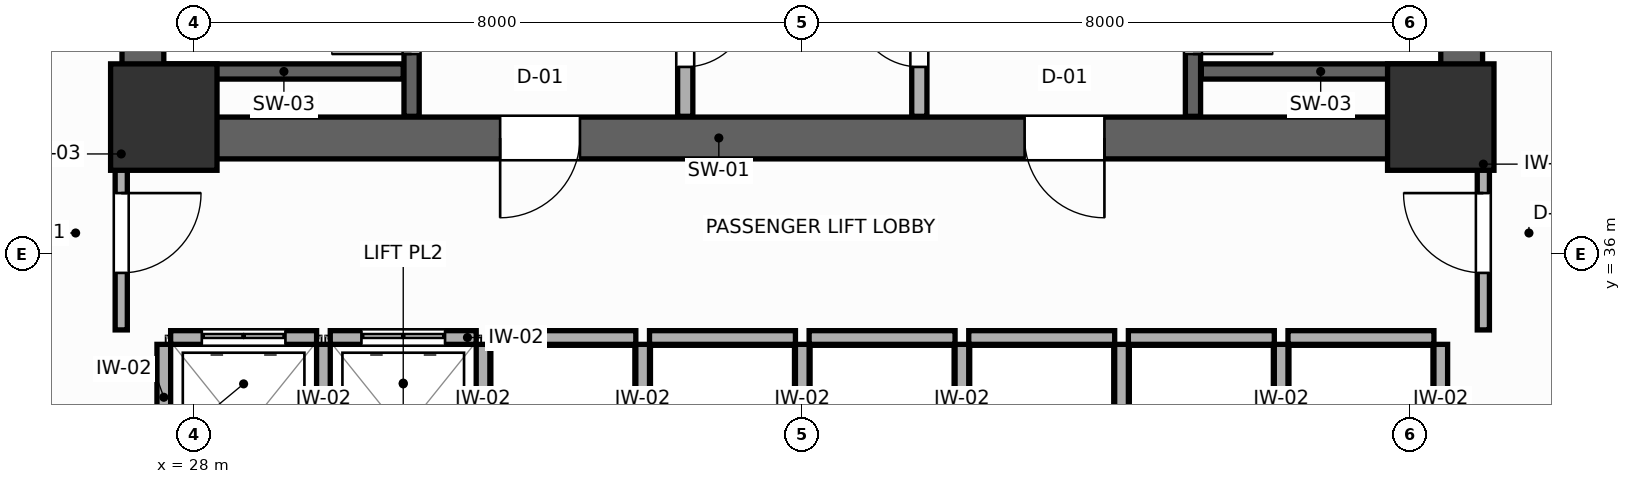
"""IFC4 building model, lengths in metres.
Left out: names, types, materials, properties, quantities, classifications, styles, units other than length and angle.
Written with IfcOpenShell. Run it as: python <this file> out.ifc"""

import sys

from ifc_helpers import new_model, si_unit, direction, frame, frame_2d, origin, origin_2d, place, context, subcontext, project, spatial, rectangle, extrude, source, transform, mapped, element, fill, save


model = new_model("IFC4")
c1 = context("Model", 3, precision=1e-05, world=origin(), true_north=direction((0.0, 1.0)))
c2 = subcontext(c1, "Body", "Model", "MODEL_VIEW")
j1 = project(units=[si_unit("LENGTHUNIT", "METRE"), si_unit("PLANEANGLEUNIT", "RADIAN")], contexts=[c1])
p1 = place(None, origin())
s1 = spatial("IfcSite", under=j1, at=p1, CompositionType="ELEMENT")
p2 = place(p1, origin())
s2 = spatial("IfcBuilding", under=s1, at=p2, CompositionType="ELEMENT")
p3 = place(p2, frame((0.0, 0.0, 95.1)))
s3 = spatial("IfcBuildingStorey", under=s2, at=p3, CompositionType="ELEMENT", Elevation=95.1)
p4 = place(p3, frame((27.05, 37.525, 0.0), z_axis=(0.0, 0.0, 1.0), x_axis=(1.0, 0.0, 0.0)))
e1 = element("IfcWall", 1, at=p4, inside=s3, PredefinedType="SHEAR", context=c2, shape_type="SweptSolid", body=[
    extrude(rectangle(XDim=17.9, YDim=0.55, at=frame_2d((8.95, 0.0))), origin(), (0.0, 0.0, 1.0), 3.9),
])
p5 = place(p4, frame((4.975, 0.0, 0.0)))
e2 = element("IfcOpeningElement", 2, at=p5, cuts=e1, PredefinedType="OPENING", context=c2, shape_type="SweptSolid", body=[
    extrude(rectangle(XDim=1.05, YDim=2.1, at=frame_2d((0.525, 1.05))), frame((0.0, 0.285, 0.0), z_axis=(0.0, -1.0, 0.0), x_axis=(1.0, 0.0, 0.0)), (0.0, 0.0, 1.0), 0.57),
])
p6 = place(p4, frame((11.875, 0.0, 0.0)))
e3 = element("IfcOpeningElement", 3, at=p6, cuts=e1, PredefinedType="OPENING", context=c2, shape_type="SweptSolid", body=[
    extrude(rectangle(XDim=1.05, YDim=2.1, at=frame_2d((0.525, 1.05))), frame((0.0, 0.285, 0.0), z_axis=(0.0, -1.0, 0.0), x_axis=(1.0, 0.0, 0.0)), (0.0, 0.0, 1.0), 0.57),
])
for number, where, z_axis, x_axis in (
    (4, (27.325, 37.8, 0.0), (0.0, 0.0, 1.0), (0.0, 1.0, 0.0)),
    (5, (44.675, 37.8, 0.0), (0.0, 0.0, 1.0), (0.0, 1.0, 0.0)),
):
    element("IfcWall", number, at=place(p3, frame(where, z_axis=z_axis, x_axis=x_axis)), inside=s3, PredefinedType="SHEAR", context=c2, shape_type="SweptSolid", body=[
        extrude(rectangle(XDim=9.0, YDim=0.55, at=frame_2d((4.5, 0.0))), origin(), (0.0, 0.0, 1.0), 3.9),
    ])
m1 = source(origin(), c2, "Body", "SweptSolid", [
    extrude(rectangle(XDim=1.4, YDim=1.4, at=origin_2d()), origin(), (0.0, 0.0, 1.0), 3.9),
])
for number, where, z_axis, x_axis in (
    (6, (27.6, 37.8, 0.0), (0.0, 0.0, 1.0), (1.0, 0.0, 0.0)),
    (7, (44.4, 37.8, 0.0), (0.0, 0.0, 1.0), (1.0, 0.0, 0.0)),
):
    element("IfcColumn", number, at=place(p3, frame(where, z_axis=z_axis, x_axis=x_axis)), inside=s3, PredefinedType="COLUMN", context=c2, shape_type="MappedRepresentation", body=[
        mapped(m1, transform((0.0, 0.0, 0.0), scale=1.0)),
    ])
p7 = place(p3, frame((30.86, 37.81, 0.0), z_axis=(0.0, 0.0, 1.0), x_axis=(0.0, 1.0, 0.0)))
e8 = element("IfcWall", 8, at=p7, inside=s3, PredefinedType="SHEAR", context=c2, shape_type="SweptSolid", body=[
    extrude(rectangle(XDim=8.98, YDim=0.2, at=frame_2d((4.49, 0.0))), origin(), (0.0, 0.0, 1.0), 3.9),
])
p8 = place(p7, frame((0.82, 0.0, 0.0)))
e9 = element("IfcOpeningElement", 9, at=p8, cuts=e8, PredefinedType="OPENING", context=c2, shape_type="SweptSolid", body=[
    extrude(rectangle(XDim=1.05, YDim=2.1, at=frame_2d((0.525, 1.05))), frame((0.0, 0.11, 0.0), z_axis=(0.0, -1.0, 0.0), x_axis=(1.0, 0.0, 0.0)), (0.0, 0.0, 1.0), 0.22),
])
p9 = place(p3, frame((27.61, 38.4, 0.0), z_axis=(0.0, 0.0, 1.0), x_axis=(1.0, 0.0, 0.0)))
e10 = element("IfcWall", 10, at=p9, inside=s3, PredefinedType="SHEAR", context=c2, shape_type="SweptSolid", body=[
    extrude(rectangle(XDim=3.14, YDim=0.2, at=frame_2d((1.57, 0.0))), origin(), (0.0, 0.0, 1.0), 3.9),
])
p10 = place(p3, frame((41.14, 37.81, 0.0), z_axis=(0.0, 0.0, 1.0), x_axis=(0.0, 1.0, 0.0)))
e11 = element("IfcWall", 11, at=p10, inside=s3, PredefinedType="SHEAR", context=c2, shape_type="SweptSolid", body=[
    extrude(rectangle(XDim=8.98, YDim=0.2, at=frame_2d((4.49, 0.0))), origin(), (0.0, 0.0, 1.0), 3.9),
])
p11 = place(p10, frame((0.82, 0.0, 0.0)))
e12 = element("IfcOpeningElement", 12, at=p11, cuts=e11, PredefinedType="OPENING", context=c2, shape_type="SweptSolid", body=[
    extrude(rectangle(XDim=1.05, YDim=2.1, at=frame_2d((0.525, 1.05))), frame((0.0, 0.11, 0.0), z_axis=(0.0, -1.0, 0.0), x_axis=(1.0, 0.0, 0.0)), (0.0, 0.0, 1.0), 0.22),
])
p12 = place(p3, frame((41.25, 38.4, 0.0), z_axis=(0.0, 0.0, 1.0), x_axis=(1.0, 0.0, 0.0)))
e13 = element("IfcWall", 13, at=p12, inside=s3, PredefinedType="SHEAR", context=c2, shape_type="SweptSolid", body=[
    extrude(rectangle(XDim=3.14, YDim=0.2, at=frame_2d((1.57, 0.0))), origin(), (0.0, 0.0, 1.0), 3.9),
])
p13 = place(p3, frame((34.46, 37.81, 0.0), z_axis=(0.0, 0.0, 1.0), x_axis=(0.0, 1.0, 0.0)))
e14 = element("IfcWall", 14, at=p13, inside=s3, PredefinedType="PARTITIONING", context=c2, shape_type="SweptSolid", body=[
    extrude(rectangle(XDim=8.98, YDim=0.2, at=frame_2d((4.49, 0.0))), origin(), (0.0, 0.0, 1.0), 3.7),
])
p14 = place(p13, frame((0.65, 0.0, 0.0)))
e15 = element("IfcOpeningElement", 15, at=p14, cuts=e14, PredefinedType="OPENING", context=c2, shape_type="SweptSolid", body=[
    extrude(rectangle(XDim=0.85, YDim=2.05, at=frame_2d((0.425, 1.025))), frame((0.0, 0.11, 0.0), z_axis=(0.0, -1.0, 0.0), x_axis=(1.0, 0.0, 0.0)), (0.0, 0.0, 1.0), 0.22),
])
p15 = place(p3, frame((37.54, 37.81, 0.0), z_axis=(0.0, 0.0, 1.0), x_axis=(0.0, 1.0, 0.0)))
e16 = element("IfcWall", 16, at=p15, inside=s3, PredefinedType="PARTITIONING", context=c2, shape_type="SweptSolid", body=[
    extrude(rectangle(XDim=8.98, YDim=0.2, at=frame_2d((4.49, 0.0))), origin(), (0.0, 0.0, 1.0), 3.7),
])
p16 = place(p15, frame((0.65, 0.0, 0.0)))
e17 = element("IfcOpeningElement", 17, at=p16, cuts=e16, PredefinedType="OPENING", context=c2, shape_type="SweptSolid", body=[
    extrude(rectangle(XDim=0.85, YDim=2.05, at=frame_2d((0.425, 1.025))), frame((0.0, 0.11, 0.0), z_axis=(0.0, -1.0, 0.0), x_axis=(1.0, 0.0, 0.0)), (0.0, 0.0, 1.0), 0.22),
])
p17 = place(p3, frame((27.69, 34.9, 0.0), z_axis=(0.0, 0.0, 1.0), x_axis=(1.0, 0.0, 0.0)))
e18 = element("IfcWall", 18, at=p17, inside=s3, PredefinedType="PARTITIONING", context=c2, shape_type="SweptSolid", body=[
    extrude(rectangle(XDim=1.92, YDim=0.18, at=frame_2d((0.96, 0.0))), origin(), (0.0, 0.0, 1.0), 3.7),
])
p18 = place(p17, frame((0.41, 0.0, 0.0)))
e19 = element("IfcOpeningElement", 19, at=p18, cuts=e18, PredefinedType="OPENING", context=c2, shape_type="SweptSolid", body=[
    extrude(rectangle(XDim=1.1, YDim=2.1, at=frame_2d((0.55, 1.05))), frame((0.0, 0.1, 0.0), z_axis=(0.0, -1.0, 0.0), x_axis=(1.0, 0.0, 0.0)), (0.0, 0.0, 1.0), 0.2),
])
p19 = place(p3, frame((27.6, 32.49, 0.0), z_axis=(0.0, 0.0, 1.0), x_axis=(0.0, 1.0, 0.0)))
e20 = element("IfcWall", 20, at=p19, inside=s3, PredefinedType="PARTITIONING", context=c2, shape_type="SweptSolid", body=[
    extrude(rectangle(XDim=2.32, YDim=0.18, at=frame_2d((1.16, 0.0))), origin(), (0.0, 0.0, 1.0), 3.7),
])
p20 = place(p3, frame((29.79, 34.9, 0.0), z_axis=(0.0, 0.0, 1.0), x_axis=(1.0, 0.0, 0.0)))
e21 = element("IfcWall", 21, at=p20, inside=s3, PredefinedType="PARTITIONING", context=c2, shape_type="SweptSolid", body=[
    extrude(rectangle(XDim=1.92, YDim=0.18, at=frame_2d((0.96, 0.0))), origin(), (0.0, 0.0, 1.0), 3.7),
])
p21 = place(p20, frame((0.41, 0.0, 0.0)))
e22 = element("IfcOpeningElement", 22, at=p21, cuts=e21, PredefinedType="OPENING", context=c2, shape_type="SweptSolid", body=[
    extrude(rectangle(XDim=1.1, YDim=2.1, at=frame_2d((0.55, 1.05))), frame((0.0, 0.1, 0.0), z_axis=(0.0, -1.0, 0.0), x_axis=(1.0, 0.0, 0.0)), (0.0, 0.0, 1.0), 0.2),
])
p22 = place(p3, frame((29.7, 32.49, 0.0), z_axis=(0.0, 0.0, 1.0), x_axis=(0.0, 1.0, 0.0)))
e23 = element("IfcWall", 23, at=p22, inside=s3, PredefinedType="PARTITIONING", context=c2, shape_type="SweptSolid", body=[
    extrude(rectangle(XDim=2.32, YDim=0.18, at=frame_2d((1.16, 0.0))), origin(), (0.0, 0.0, 1.0), 3.7),
])
p23 = place(p3, frame((31.89, 34.9, 0.0), z_axis=(0.0, 0.0, 1.0), x_axis=(1.0, 0.0, 0.0)))
e24 = element("IfcWall", 24, at=p23, inside=s3, PredefinedType="PARTITIONING", context=c2, shape_type="SweptSolid", body=[
    extrude(rectangle(XDim=1.92, YDim=0.18, at=frame_2d((0.96, 0.0))), origin(), (0.0, 0.0, 1.0), 3.7),
])
p24 = place(p3, frame((31.8, 32.49, 0.0), z_axis=(0.0, 0.0, 1.0), x_axis=(0.0, 1.0, 0.0)))
e25 = element("IfcWall", 25, at=p24, inside=s3, PredefinedType="PARTITIONING", context=c2, shape_type="SweptSolid", body=[
    extrude(rectangle(XDim=2.32, YDim=0.18, at=frame_2d((1.16, 0.0))), origin(), (0.0, 0.0, 1.0), 3.7),
])
p25 = place(p3, frame((33.99, 34.9, 0.0), z_axis=(0.0, 0.0, 1.0), x_axis=(1.0, 0.0, 0.0)))
e26 = element("IfcWall", 26, at=p25, inside=s3, PredefinedType="PARTITIONING", context=c2, shape_type="SweptSolid", body=[
    extrude(rectangle(XDim=1.92, YDim=0.18, at=frame_2d((0.96, 0.0))), origin(), (0.0, 0.0, 1.0), 3.7),
])
p26 = place(p3, frame((33.9, 32.49, 0.0), z_axis=(0.0, 0.0, 1.0), x_axis=(0.0, 1.0, 0.0)))
e27 = element("IfcWall", 27, at=p26, inside=s3, PredefinedType="PARTITIONING", context=c2, shape_type="SweptSolid", body=[
    extrude(rectangle(XDim=2.32, YDim=0.18, at=frame_2d((1.16, 0.0))), origin(), (0.0, 0.0, 1.0), 3.7),
])
p27 = place(p3, frame((36.09, 34.9, 0.0), z_axis=(0.0, 0.0, 1.0), x_axis=(1.0, 0.0, 0.0)))
e28 = element("IfcWall", 28, at=p27, inside=s3, PredefinedType="PARTITIONING", context=c2, shape_type="SweptSolid", body=[
    extrude(rectangle(XDim=1.92, YDim=0.18, at=frame_2d((0.96, 0.0))), origin(), (0.0, 0.0, 1.0), 3.7),
])
p28 = place(p3, frame((36.0, 32.49, 0.0), z_axis=(0.0, 0.0, 1.0), x_axis=(0.0, 1.0, 0.0)))
e29 = element("IfcWall", 29, at=p28, inside=s3, PredefinedType="PARTITIONING", context=c2, shape_type="SweptSolid", body=[
    extrude(rectangle(XDim=2.32, YDim=0.18, at=frame_2d((1.16, 0.0))), origin(), (0.0, 0.0, 1.0), 3.7),
])
p29 = place(p3, frame((38.19, 34.9, 0.0), z_axis=(0.0, 0.0, 1.0), x_axis=(1.0, 0.0, 0.0)))
e30 = element("IfcWall", 30, at=p29, inside=s3, PredefinedType="PARTITIONING", context=c2, shape_type="SweptSolid", body=[
    extrude(rectangle(XDim=1.92, YDim=0.18, at=frame_2d((0.96, 0.0))), origin(), (0.0, 0.0, 1.0), 3.7),
])
p30 = place(p3, frame((38.1, 32.49, 0.0), z_axis=(0.0, 0.0, 1.0), x_axis=(0.0, 1.0, 0.0)))
e31 = element("IfcWall", 31, at=p30, inside=s3, PredefinedType="PARTITIONING", context=c2, shape_type="SweptSolid", body=[
    extrude(rectangle(XDim=2.32, YDim=0.18, at=frame_2d((1.16, 0.0))), origin(), (0.0, 0.0, 1.0), 3.7),
])
p31 = place(p3, frame((40.29, 34.9, 0.0), z_axis=(0.0, 0.0, 1.0), x_axis=(1.0, 0.0, 0.0)))
e32 = element("IfcWall", 32, at=p31, inside=s3, PredefinedType="PARTITIONING", context=c2, shape_type="SweptSolid", body=[
    extrude(rectangle(XDim=1.92, YDim=0.18, at=frame_2d((0.96, 0.0))), origin(), (0.0, 0.0, 1.0), 3.7),
])
p32 = place(p3, frame((40.2, 32.49, 0.0), z_axis=(0.0, 0.0, 1.0), x_axis=(0.0, 1.0, 0.0)))
e33 = element("IfcWall", 33, at=p32, inside=s3, PredefinedType="PARTITIONING", context=c2, shape_type="SweptSolid", body=[
    extrude(rectangle(XDim=2.32, YDim=0.18, at=frame_2d((1.16, 0.0))), origin(), (0.0, 0.0, 1.0), 3.7),
])
p33 = place(p3, frame((42.39, 34.9, 0.0), z_axis=(0.0, 0.0, 1.0), x_axis=(1.0, 0.0, 0.0)))
e34 = element("IfcWall", 34, at=p33, inside=s3, PredefinedType="PARTITIONING", context=c2, shape_type="SweptSolid", body=[
    extrude(rectangle(XDim=1.92, YDim=0.18, at=frame_2d((0.96, 0.0))), origin(), (0.0, 0.0, 1.0), 3.7),
])
for number, where, z_axis, x_axis in (
    (35, (42.3, 32.49, 0.0), (0.0, 0.0, 1.0), (0.0, 1.0, 0.0)),
    (36, (44.4, 32.49, 0.0), (0.0, 0.0, 1.0), (0.0, 1.0, 0.0)),
):
    element("IfcWall", number, at=place(p3, frame(where, z_axis=z_axis, x_axis=x_axis)), inside=s3, PredefinedType="PARTITIONING", context=c2, shape_type="SweptSolid", body=[
        extrude(rectangle(XDim=2.32, YDim=0.18, at=frame_2d((1.16, 0.0))), origin(), (0.0, 0.0, 1.0), 3.7),
    ])
p34 = place(p3, frame((27.04, 35.0, 0.0), z_axis=(0.0, 0.0, 1.0), x_axis=(0.0, 1.0, 0.0)))
e37 = element("IfcWall", 37, at=p34, inside=s3, PredefinedType="PARTITIONING", context=c2, shape_type="SweptSolid", body=[
    extrude(rectangle(XDim=2.65, YDim=0.16, at=frame_2d((1.325, 0.0))), origin(), (0.0, 0.0, 1.0), 3.7),
])
p35 = place(p34, frame((0.75, 0.0, 0.0)))
e38 = element("IfcOpeningElement", 38, at=p35, cuts=e37, PredefinedType="OPENING", context=c2, shape_type="SweptSolid", body=[
    extrude(rectangle(XDim=1.05, YDim=2.1, at=frame_2d((0.525, 1.05))), frame((0.0, 0.09, 0.0), z_axis=(0.0, -1.0, 0.0), x_axis=(1.0, 0.0, 0.0)), (0.0, 0.0, 1.0), 0.18),
])
p36 = place(p3, frame((44.96, 35.0, 0.0), z_axis=(0.0, 0.0, 1.0), x_axis=(0.0, 1.0, 0.0)))
e39 = element("IfcWall", 39, at=p36, inside=s3, PredefinedType="PARTITIONING", context=c2, shape_type="SweptSolid", body=[
    extrude(rectangle(XDim=2.65, YDim=0.16, at=frame_2d((1.325, 0.0))), origin(), (0.0, 0.0, 1.0), 3.7),
])
p37 = place(p36, frame((0.75, 0.0, 0.0)))
e40 = element("IfcOpeningElement", 40, at=p37, cuts=e39, PredefinedType="OPENING", context=c2, shape_type="SweptSolid", body=[
    extrude(rectangle(XDim=1.05, YDim=2.1, at=frame_2d((0.525, 1.05))), frame((0.0, 0.09, 0.0), z_axis=(0.0, -1.0, 0.0), x_axis=(1.0, 0.0, 0.0)), (0.0, 0.0, 1.0), 0.18),
])
p38 = place(p8, origin())
e41 = element("IfcDoor", 41, at=p38, inside=s3, OperationType="SINGLE_SWING_LEFT", PredefinedType="DOOR", context=c2, shape_type="SweptSolid", body=[
    extrude(rectangle(XDim=1.05, YDim=2.1, at=frame_2d((0.525, 1.05))), frame((0.0, 0.025, 0.0), z_axis=(0.0, -1.0, 0.0), x_axis=(1.0, 0.0, 0.0)), (0.0, 0.0, 1.0), 0.05),
])
fill(e9, e41)
p39 = place(p11, frame((1.05, 0.0, 0.0), z_axis=(0.0, 0.0, 1.0), x_axis=(-1.0, 0.0, 0.0)))
e42 = element("IfcDoor", 42, at=p39, inside=s3, OperationType="SINGLE_SWING_RIGHT", PredefinedType="DOOR", context=c2, shape_type="SweptSolid", body=[
    extrude(rectangle(XDim=1.05, YDim=2.1, at=frame_2d((0.525, 1.05))), frame((0.0, 0.025, 0.0), z_axis=(0.0, -1.0, 0.0), x_axis=(1.0, 0.0, 0.0)), (0.0, 0.0, 1.0), 0.05),
])
fill(e12, e42)
p40 = place(p14, frame((0.85, 0.0, 0.0), z_axis=(0.0, 0.0, 1.0), x_axis=(-1.0, 0.0, 0.0)))
e43 = element("IfcDoor", 43, at=p40, inside=s3, OperationType="SINGLE_SWING_LEFT", PredefinedType="DOOR", context=c2, shape_type="SweptSolid", body=[
    extrude(rectangle(XDim=0.85, YDim=2.05, at=frame_2d((0.425, 1.025))), frame((0.0, 0.025, 0.0), z_axis=(0.0, -1.0, 0.0), x_axis=(1.0, 0.0, 0.0)), (0.0, 0.0, 1.0), 0.05),
])
fill(e15, e43)
p41 = place(p16, origin())
e44 = element("IfcDoor", 44, at=p41, inside=s3, OperationType="SINGLE_SWING_RIGHT", PredefinedType="DOOR", context=c2, shape_type="SweptSolid", body=[
    extrude(rectangle(XDim=0.85, YDim=2.05, at=frame_2d((0.425, 1.025))), frame((0.0, 0.025, 0.0), z_axis=(0.0, -1.0, 0.0), x_axis=(1.0, 0.0, 0.0)), (0.0, 0.0, 1.0), 0.05),
])
fill(e17, e44)
p42 = place(p18, origin())
e45 = element("IfcDoor", 45, at=p42, inside=s3, OperationType="DOUBLE_DOOR_SLIDING", PredefinedType="DOOR", context=c2, shape_type="SweptSolid", body=[
    extrude(rectangle(XDim=1.1, YDim=2.1, at=frame_2d((0.55, 1.05))), frame((0.0, 0.025, 0.0), z_axis=(0.0, -1.0, 0.0), x_axis=(1.0, 0.0, 0.0)), (0.0, 0.0, 1.0), 0.05),
])
fill(e19, e45)
p43 = place(p21, origin())
e46 = element("IfcDoor", 46, at=p43, inside=s3, OperationType="DOUBLE_DOOR_SLIDING", PredefinedType="DOOR", context=c2, shape_type="SweptSolid", body=[
    extrude(rectangle(XDim=1.1, YDim=2.1, at=frame_2d((0.55, 1.05))), frame((0.0, 0.025, 0.0), z_axis=(0.0, -1.0, 0.0), x_axis=(1.0, 0.0, 0.0)), (0.0, 0.0, 1.0), 0.05),
])
fill(e22, e46)
p44 = place(p35, frame((1.05, 0.0, 0.0), z_axis=(0.0, 0.0, 1.0), x_axis=(-1.0, 0.0, 0.0)))
e47 = element("IfcDoor", 47, at=p44, inside=s3, OperationType="SINGLE_SWING_LEFT", PredefinedType="DOOR", context=c2, shape_type="SweptSolid", body=[
    extrude(rectangle(XDim=1.05, YDim=2.1, at=frame_2d((0.525, 1.05))), frame((0.0, 0.025, 0.0), z_axis=(0.0, -1.0, 0.0), x_axis=(1.0, 0.0, 0.0)), (0.0, 0.0, 1.0), 0.05),
])
fill(e38, e47)
p45 = place(p37, origin())
e48 = element("IfcDoor", 48, at=p45, inside=s3, OperationType="SINGLE_SWING_RIGHT", PredefinedType="DOOR", context=c2, shape_type="SweptSolid", body=[
    extrude(rectangle(XDim=1.05, YDim=2.1, at=frame_2d((0.525, 1.05))), frame((0.0, 0.025, 0.0), z_axis=(0.0, -1.0, 0.0), x_axis=(1.0, 0.0, 0.0)), (0.0, 0.0, 1.0), 0.05),
])
fill(e40, e48)
p46 = place(p5, frame((1.05, 0.0, 0.0), z_axis=(0.0, 0.0, 1.0), x_axis=(-1.0, 0.0, 0.0)))
e49 = element("IfcDoor", 49, at=p46, inside=s3, OperationType="SINGLE_SWING_RIGHT", PredefinedType="DOOR", context=c2, shape_type="SweptSolid", body=[
    extrude(rectangle(XDim=1.05, YDim=2.1, at=frame_2d((0.525, 1.05))), frame((0.0, 0.025, 0.0), z_axis=(0.0, -1.0, 0.0), x_axis=(1.0, 0.0, 0.0)), (0.0, 0.0, 1.0), 0.05),
])
fill(e2, e49)
p47 = place(p6, frame((1.05, 0.0, 0.0), z_axis=(0.0, 0.0, 1.0), x_axis=(-1.0, 0.0, 0.0)))
e50 = element("IfcDoor", 50, at=p47, inside=s3, OperationType="SINGLE_SWING_LEFT", PredefinedType="DOOR", context=c2, shape_type="SweptSolid", body=[
    extrude(rectangle(XDim=1.05, YDim=2.1, at=frame_2d((0.525, 1.05))), frame((0.0, 0.025, 0.0), z_axis=(0.0, -1.0, 0.0), x_axis=(1.0, 0.0, 0.0)), (0.0, 0.0, 1.0), 0.05),
])
fill(e3, e50)
save(model, sys.argv[1])
